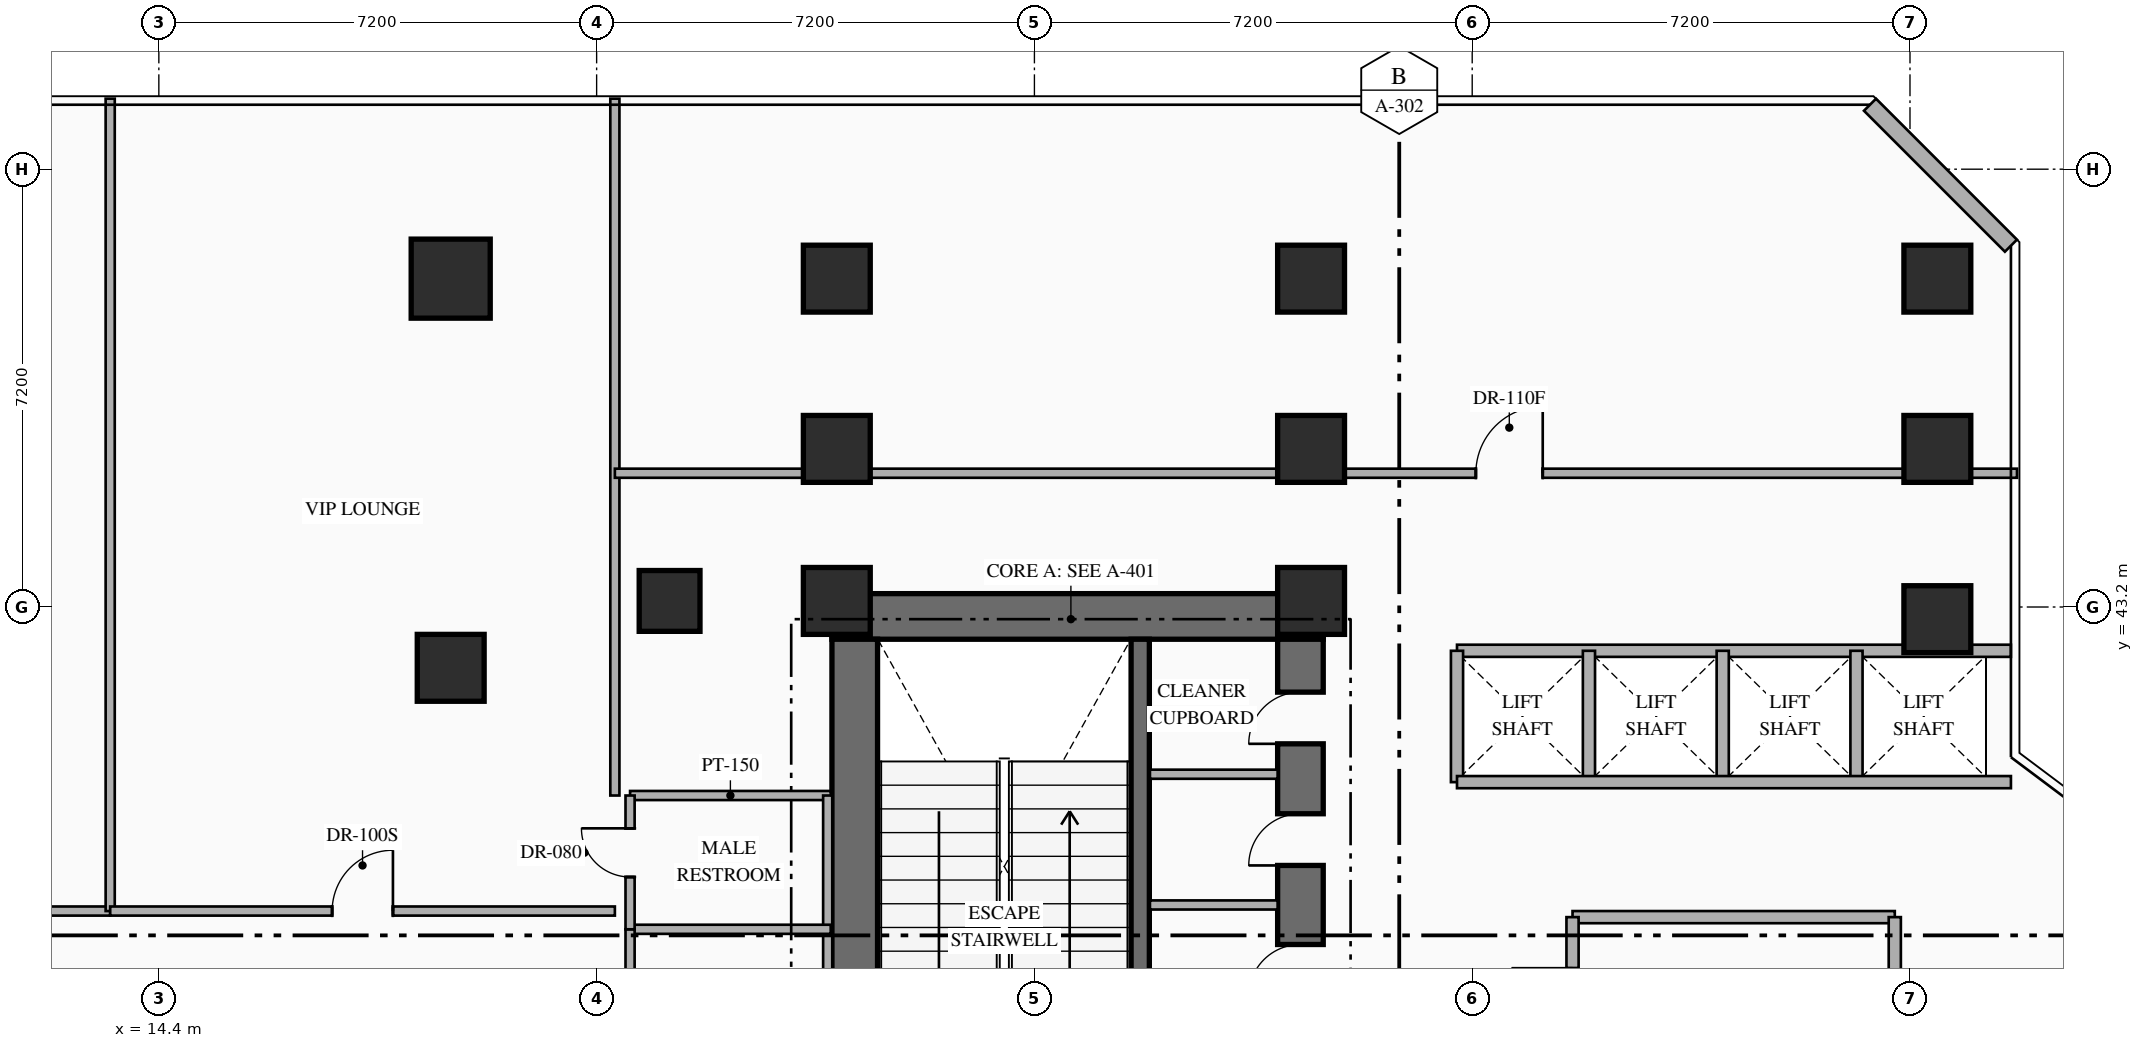
"""IFC4 building model, lengths in metres.
Left out: names, types, materials, properties, quantities, classifications, styles, units other than length and angle.
Written with IfcOpenShell. Run it as: python <this file> out.ifc"""

import sys

from ifc_helpers import new_model, si_unit, direction, frame, frame_2d, origin, origin_2d, place, context, subcontext, project, spatial, rectangle, hollow_rectangle, extrude, element, fill, save


model = new_model("IFC4")
c1 = context("Model", 3, precision=1e-05, world=origin(), true_north=direction((0.0, 1.0)))
c2 = subcontext(c1, "Body", "Model", "MODEL_VIEW")
j1 = project(units=[si_unit("LENGTHUNIT", "METRE"), si_unit("PLANEANGLEUNIT", "RADIAN")], contexts=[c1])
p1 = place(None, origin())
s1 = spatial("IfcSite", under=j1, at=p1, CompositionType="ELEMENT")
p2 = place(p1, origin())
s2 = spatial("IfcBuilding", under=s1, at=p2, CompositionType="ELEMENT")
p3 = place(p2, frame((0.0, 0.0, 10.8)))
s3 = spatial("IfcBuildingStorey", under=s2, at=p3, CompositionType="ELEMENT", Elevation=10.8)
p4 = place(p3, frame((25.47, 43.045, 0.0), z_axis=(0.0, 0.0, 1.0), x_axis=(1.0, 0.0, 0.0)))
e1 = element("IfcWall", 1, at=p4, inside=s3, PredefinedType="SHEAR", context=c2, shape_type="SweptSolid", body=[
    extrude(rectangle(XDim=8.08, YDim=0.75, at=frame_2d((4.04, 0.0))), origin(), (0.0, 0.0, 1.0), 5.4),
])
p5 = place(p3, frame((25.845, 33.19, 0.0), z_axis=(0.0, 0.0, 1.0), x_axis=(0.0, 1.0, 0.0)))
e2 = element("IfcWall", 2, at=p5, inside=s3, PredefinedType="SHEAR", context=c2, shape_type="SweptSolid", body=[
    extrude(rectangle(XDim=9.48, YDim=0.75, at=frame_2d((4.74, 0.0))), origin(), (0.0, 0.0, 1.0), 5.4),
])
p6 = place(p3, frame((33.175, 33.19, 0.0), z_axis=(0.0, 0.0, 1.0), x_axis=(0.0, 1.0, 0.0)))
e3 = element("IfcWall", 3, at=p6, inside=s3, PredefinedType="SHEAR", context=c2, shape_type="SweptSolid", body=[
    extrude(rectangle(XDim=9.48, YDim=0.75, at=frame_2d((4.74, 0.0))), origin(), (0.0, 0.0, 1.0), 5.4),
])
p7 = place(p6, frame((3.61, 0.0, 0.0)))
e4 = element("IfcOpeningElement", 4, at=p7, cuts=e3, PredefinedType="OPENING", context=c2, shape_type="SweptSolid", body=[
    extrude(rectangle(XDim=0.85, YDim=2.08, at=frame_2d((0.425, 1.04))), frame((0.0, 0.385, 0.0), z_axis=(0.0, -1.0, 0.0), x_axis=(1.0, 0.0, 0.0)), (0.0, 0.0, 1.0), 0.77),
])
p8 = place(p6, frame((5.76, 0.0, 0.0)))
e5 = element("IfcOpeningElement", 5, at=p8, cuts=e3, PredefinedType="OPENING", context=c2, shape_type="SweptSolid", body=[
    extrude(rectangle(XDim=0.85, YDim=2.08, at=frame_2d((0.425, 1.04))), frame((0.0, 0.385, 0.0), z_axis=(0.0, -1.0, 0.0), x_axis=(1.0, 0.0, 0.0)), (0.0, 0.0, 1.0), 0.77),
])
p9 = place(p6, frame((7.76, 0.0, 0.0)))
e6 = element("IfcOpeningElement", 6, at=p9, cuts=e3, PredefinedType="OPENING", context=c2, shape_type="SweptSolid", body=[
    extrude(rectangle(XDim=0.85, YDim=2.08, at=frame_2d((0.425, 1.04))), frame((0.0, 0.385, 0.0), z_axis=(0.0, -1.0, 0.0), x_axis=(1.0, 0.0, 0.0)), (0.0, 0.0, 1.0), 0.77),
])
p10 = place(p3, frame((30.54, 33.19, 0.0), z_axis=(0.0, 0.0, 1.0), x_axis=(0.0, 1.0, 0.0)))
e7 = element("IfcWall", 7, at=p10, inside=s3, PredefinedType="SHEAR", context=c2, shape_type="SweptSolid", body=[
    extrude(rectangle(XDim=9.48, YDim=0.3, at=frame_2d((4.74, 0.0))), origin(), (0.0, 0.0, 1.0), 5.4),
])
for number, where, z_axis, x_axis in (
    (8, (25.55, 43.3, 0.0), (0.0, 0.0, 1.0), (1.0, 0.0, 0.0)),
    (9, (33.35, 43.3, 0.0), (0.0, 0.0, 1.0), (1.0, 0.0, 0.0)),
    (10, (43.65, 43.0, 0.0), (0.0, 0.0, 1.0), (1.0, 0.0, 0.0)),
):
    element("IfcColumn", number, at=place(p3, frame(where, z_axis=z_axis, x_axis=x_axis)), inside=s3, PredefinedType="COLUMN", context=c2, shape_type="SweptSolid", body=[
        extrude(rectangle(XDim=1.1, YDim=1.1, at=origin_2d()), origin(), (0.0, 0.0, 1.0), 5.4),
    ])
for number, where, z_axis, x_axis in (
    (11, (25.55, 45.8, 0.0), (0.0, 0.0, 1.0), (1.0, 0.0, 0.0)),
    (12, (33.35, 45.8, 0.0), (0.0, 0.0, 1.0), (1.0, 0.0, 0.0)),
    (13, (43.65, 45.8, 0.0), (0.0, 0.0, 1.0), (1.0, 0.0, 0.0)),
):
    element("IfcColumn", number, at=place(p3, frame(where, z_axis=z_axis, x_axis=x_axis)), inside=s3, PredefinedType="COLUMN", context=c2, shape_type="SweptSolid", body=[
        extrude(hollow_rectangle(XDim=1.1, YDim=1.1, WallThickness=0.04, at=origin_2d()), origin(), (0.0, 0.0, 1.0), 5.4),
    ])
p11 = place(p3, frame((19.2, 48.6, 0.0), z_axis=(0.0, 0.0, 1.0), x_axis=(1.0, 0.0, 0.0)))
e14 = element("IfcColumn", 14, at=p11, inside=s3, PredefinedType="COLUMN", context=c2, shape_type="SweptSolid", body=[
    extrude(rectangle(XDim=1.3, YDim=1.3, at=origin_2d()), origin(), (0.0, 0.0, 1.0), 5.4),
])
for number, where, z_axis, x_axis in (
    (15, (25.55, 48.6, 0.0), (0.0, 0.0, 1.0), (1.0, 0.0, 0.0)),
    (16, (33.35, 48.6, 0.0), (0.0, 0.0, 1.0), (1.0, 0.0, 0.0)),
    (17, (43.65, 48.6, 0.0), (0.0, 0.0, 1.0), (1.0, 0.0, 0.0)),
    (18, (19.2, 42.2, 0.0), (0.0, 0.0, 1.0), (1.0, 0.0, 0.0)),
):
    element("IfcColumn", number, at=place(p3, frame(where, z_axis=z_axis, x_axis=x_axis)), inside=s3, PredefinedType="COLUMN", context=c2, shape_type="SweptSolid", body=[
        extrude(hollow_rectangle(XDim=1.1, YDim=1.1, WallThickness=0.04, at=origin_2d()), origin(), (0.0, 0.0, 1.0), 5.4),
    ])
p12 = place(p3, frame((22.8, 43.3, 0.0), z_axis=(0.0, 0.0, 1.0), x_axis=(1.0, 0.0, 0.0)))
e19 = element("IfcColumn", 19, at=p12, inside=s3, PredefinedType="COLUMN", context=c2, shape_type="SweptSolid", body=[
    extrude(hollow_rectangle(XDim=1.0, YDim=1.0, WallThickness=0.038, at=origin_2d()), origin(), (0.0, 0.0, 1.0), 5.4),
])
p13 = place(p3, frame((42.542, 51.46, 0.0), z_axis=(0.0, 0.0, 1.0), x_axis=(0.707144017911, -0.707069542501, 0.0)))
e20 = element("IfcWall", 20, at=p13, inside=s3, PredefinedType="STANDARD", context=c2, shape_type="SweptSolid", body=[
    extrude(rectangle(XDim=3.278, YDim=0.28, at=frame_2d((1.639, 0.0))), origin(), (0.0, 0.0, 1.0), 5.1),
])
for number, where, z_axis, x_axis in (
    (21, (30.7, 38.3, 0.0), (0.0, 0.0, 1.0), (1.0, 0.0, 0.0)),
    (22, (30.7, 40.45, 0.0), (0.0, 0.0, 1.0), (1.0, 0.0, 0.0)),
):
    element("IfcWall", number, at=place(p3, frame(where, z_axis=z_axis, x_axis=x_axis)), inside=s3, PredefinedType="PARTITIONING", context=c2, shape_type="SweptSolid", body=[
        extrude(rectangle(XDim=2.1, YDim=0.15, at=frame_2d((1.05, 0.0))), origin(), (0.0, 0.0, 1.0), 5.1),
    ])
p14 = place(p3, frame((37.65, 38.1, 0.0), z_axis=(0.0, 0.0, 1.0), x_axis=(1.0, 0.0, 0.0)))
e23 = element("IfcWall", 23, at=p14, inside=s3, PredefinedType="STANDARD", context=c2, shape_type="SweptSolid", body=[
    extrude(rectangle(XDim=5.3, YDim=0.2, at=frame_2d((2.65, 0.0))), origin(), (0.0, 0.0, 1.0), 5.1),
])
p15 = place(p3, frame((42.95, 35.42, 0.0), z_axis=(0.0, 0.0, 1.0), x_axis=(0.0, 1.0, 0.0)))
e24 = element("IfcWall", 24, at=p15, inside=s3, PredefinedType="STANDARD", context=c2, shape_type="SweptSolid", body=[
    extrude(rectangle(XDim=2.68, YDim=0.2, at=frame_2d((1.34, 0.0))), origin(), (0.0, 0.0, 1.0), 5.1),
])
p16 = place(p3, frame((37.65, 35.42, 0.0), z_axis=(0.0, 0.0, 1.0), x_axis=(0.0, 1.0, 0.0)))
e25 = element("IfcWall", 25, at=p16, inside=s3, PredefinedType="STANDARD", context=c2, shape_type="SweptSolid", body=[
    extrude(rectangle(XDim=2.68, YDim=0.2, at=frame_2d((1.34, 0.0))), origin(), (0.0, 0.0, 1.0), 5.1),
])
p17 = place(p16, frame((0.84, 0.0, 0.0)))
e26 = element("IfcOpeningElement", 26, at=p17, cuts=e25, PredefinedType="OPENING", context=c2, shape_type="SweptSolid", body=[
    extrude(rectangle(XDim=1.0, YDim=2.2, at=frame_2d((0.5, 1.1))), frame((0.0, 0.11, 0.0), z_axis=(0.0, -1.0, 0.0), x_axis=(1.0, 0.0, 0.0)), (0.0, 0.0, 1.0), 0.22),
])
p18 = place(p3, frame((35.75, 42.48, 0.0), z_axis=(0.0, 0.0, 1.0), x_axis=(1.0, 0.0, 0.0)))
e27 = element("IfcWall", 27, at=p18, inside=s3, PredefinedType="STANDARD", context=c2, shape_type="SweptSolid", body=[
    extrude(rectangle(XDim=9.11, YDim=0.2, at=frame_2d((4.555, 0.0))), origin(), (0.0, 0.0, 1.0), 5.1),
])
for number, where, z_axis, x_axis in (
    (28, (35.75, 40.32, 0.0), (0.0, 0.0, 1.0), (0.0, 1.0, 0.0)),
    (29, (37.92, 40.32, 0.0), (0.0, 0.0, 1.0), (0.0, 1.0, 0.0)),
    (30, (40.12, 40.32, 0.0), (0.0, 0.0, 1.0), (0.0, 1.0, 0.0)),
    (31, (42.32, 40.32, 0.0), (0.0, 0.0, 1.0), (0.0, 1.0, 0.0)),
):
    element("IfcWall", number, at=place(p3, frame(where, z_axis=z_axis, x_axis=x_axis)), inside=s3, PredefinedType="STANDARD", context=c2, shape_type="SweptSolid", body=[
        extrude(rectangle(XDim=2.16, YDim=0.2, at=frame_2d((1.08, 0.0))), origin(), (0.0, 0.0, 1.0), 5.1),
    ])
p19 = place(p3, frame((35.75, 40.32, 0.0), z_axis=(0.0, 0.0, 1.0), x_axis=(1.0, 0.0, 0.0)))
e32 = element("IfcWall", 32, at=p19, inside=s3, PredefinedType="STANDARD", context=c2, shape_type="SweptSolid", body=[
    extrude(rectangle(XDim=9.11, YDim=0.2, at=frame_2d((4.555, 0.0))), origin(), (0.0, 0.0, 1.0), 5.1),
])
p20 = place(p3, frame((22.15, 40.1, 0.0), z_axis=(0.0, 0.0, 1.0), x_axis=(1.0, 0.0, 0.0)))
e33 = element("IfcWall", 33, at=p20, inside=s3, PredefinedType="PARTITIONING", context=c2, shape_type="SweptSolid", body=[
    extrude(rectangle(XDim=3.3, YDim=0.15, at=frame_2d((1.65, 0.0))), origin(), (0.0, 0.0, 1.0), 5.1),
])
p21 = place(p3, frame((25.4, 33.5, 0.0), z_axis=(0.0, 0.0, 1.0), x_axis=(0.0, 1.0, 0.0)))
e34 = element("IfcWall", 34, at=p21, inside=s3, PredefinedType="PARTITIONING", context=c2, shape_type="SweptSolid", body=[
    extrude(rectangle(XDim=6.6, YDim=0.15, at=frame_2d((3.3, 0.0))), origin(), (0.0, 0.0, 1.0), 5.1),
])
p22 = place(p3, frame((22.15, 37.9, 0.0), z_axis=(0.0, 0.0, 1.0), x_axis=(1.0, 0.0, 0.0)))
e35 = element("IfcWall", 35, at=p22, inside=s3, PredefinedType="PARTITIONING", context=c2, shape_type="SweptSolid", body=[
    extrude(rectangle(XDim=3.3, YDim=0.15, at=frame_2d((1.65, 0.0))), origin(), (0.0, 0.0, 1.0), 5.1),
])
p23 = place(p3, frame((22.15, 35.7, 0.0), z_axis=(0.0, 0.0, 1.0), x_axis=(0.0, 1.0, 0.0)))
e36 = element("IfcWall", 36, at=p23, inside=s3, PredefinedType="PARTITIONING", context=c2, shape_type="SweptSolid", body=[
    extrude(rectangle(XDim=2.2, YDim=0.15, at=frame_2d((1.1, 0.0))), origin(), (0.0, 0.0, 1.0), 5.1),
])
p24 = place(p23, frame((0.7, 0.0, 0.0)))
e37 = element("IfcOpeningElement", 37, at=p24, cuts=e36, PredefinedType="OPENING", context=c2, shape_type="SweptSolid", body=[
    extrude(rectangle(XDim=0.8, YDim=2.06, at=frame_2d((0.4, 1.03))), frame((0.0, 0.085, 0.0), z_axis=(0.0, -1.0, 0.0), x_axis=(1.0, 0.0, 0.0)), (0.0, 0.0, 1.0), 0.17),
])
p25 = place(p3, frame((22.15, 37.9, 0.0), z_axis=(0.0, 0.0, 1.0), x_axis=(0.0, 1.0, 0.0)))
e38 = element("IfcWall", 38, at=p25, inside=s3, PredefinedType="PARTITIONING", context=c2, shape_type="SweptSolid", body=[
    extrude(rectangle(XDim=2.2, YDim=0.15, at=frame_2d((1.1, 0.0))), origin(), (0.0, 0.0, 1.0), 5.1),
])
p26 = place(p25, frame((0.86, 0.0, 0.0)))
e39 = element("IfcOpeningElement", 39, at=p26, cuts=e38, PredefinedType="OPENING", context=c2, shape_type="SweptSolid", body=[
    extrude(rectangle(XDim=0.8, YDim=2.06, at=frame_2d((0.4, 1.03))), frame((0.0, 0.085, 0.0), z_axis=(0.0, -1.0, 0.0), x_axis=(1.0, 0.0, 0.0)), (0.0, 0.0, 1.0), 0.17),
])
p27 = place(p3, frame((6.2, 38.2, 0.0), z_axis=(0.0, 0.0, 1.0), x_axis=(1.0, 0.0, 0.0)))
e40 = element("IfcWall", 40, at=p27, inside=s3, PredefinedType="PARTITIONING", context=c2, shape_type="SweptSolid", body=[
    extrude(rectangle(XDim=7.4, YDim=0.15, at=frame_2d((3.7, 0.0))), origin(), (0.0, 0.0, 1.0), 5.1),
])
p28 = place(p27, frame((3.2, 0.0, 0.0)))
e41 = element("IfcOpeningElement", 41, at=p28, cuts=e40, PredefinedType="OPENING", context=c2, shape_type="SweptSolid", body=[
    extrude(rectangle(XDim=1.0, YDim=2.15, at=frame_2d((0.5, 1.075))), frame((0.0, 0.085, 0.0), z_axis=(0.0, -1.0, 0.0), x_axis=(1.0, 0.0, 0.0)), (0.0, 0.0, 1.0), 0.17),
])
p29 = place(p3, frame((13.6, 38.2, 0.0), z_axis=(0.0, 0.0, 1.0), x_axis=(0.0, 1.0, 0.0)))
e42 = element("IfcWall", 42, at=p29, inside=s3, PredefinedType="PARTITIONING", context=c2, shape_type="SweptSolid", body=[
    extrude(rectangle(XDim=13.36, YDim=0.15, at=frame_2d((6.68, 0.0))), origin(), (0.0, 0.0, 1.0), 5.1),
])
p30 = place(p3, frame((13.6, 38.2, 0.0), z_axis=(0.0, 0.0, 1.0), x_axis=(1.0, 0.0, 0.0)))
e43 = element("IfcWall", 43, at=p30, inside=s3, PredefinedType="PARTITIONING", context=c2, shape_type="SweptSolid", body=[
    extrude(rectangle(XDim=8.3, YDim=0.15, at=frame_2d((4.15, 0.0))), origin(), (0.0, 0.0, 1.0), 5.1),
])
p31 = place(p30, frame((3.65, 0.0, 0.0)))
e44 = element("IfcOpeningElement", 44, at=p31, cuts=e43, PredefinedType="OPENING", context=c2, shape_type="SweptSolid", body=[
    extrude(rectangle(XDim=1.0, YDim=2.15, at=frame_2d((0.5, 1.075))), frame((0.0, 0.085, 0.0), z_axis=(0.0, -1.0, 0.0), x_axis=(1.0, 0.0, 0.0)), (0.0, 0.0, 1.0), 0.17),
])
p32 = place(p3, frame((21.9, 40.1, 0.0), z_axis=(0.0, 0.0, 1.0), x_axis=(0.0, 1.0, 0.0)))
e45 = element("IfcWall", 45, at=p32, inside=s3, PredefinedType="PARTITIONING", context=c2, shape_type="SweptSolid", body=[
    extrude(rectangle(XDim=11.46, YDim=0.15, at=frame_2d((5.73, 0.0))), origin(), (0.0, 0.0, 1.0), 5.1),
])
p33 = place(p3, frame((21.9, 45.4, 0.0), z_axis=(0.0, 0.0, 1.0), x_axis=(1.0, 0.0, 0.0)))
e46 = element("IfcWall", 46, at=p33, inside=s3, PredefinedType="PARTITIONING", context=c2, shape_type="SweptSolid", body=[
    extrude(rectangle(XDim=23.06, YDim=0.15, at=frame_2d((11.53, 0.0))), origin(), (0.0, 0.0, 1.0), 5.1),
])
p34 = place(p33, frame((14.16, 0.0, 0.0)))
e47 = element("IfcOpeningElement", 47, at=p34, cuts=e46, PredefinedType="OPENING", context=c2, shape_type="SweptSolid", body=[
    extrude(rectangle(XDim=1.1, YDim=2.24, at=frame_2d((0.55, 1.12))), frame((0.0, 0.085, 0.0), z_axis=(0.0, -1.0, 0.0), x_axis=(1.0, 0.0, 0.0)), (0.0, 0.0, 1.0), 0.17),
])
p35 = place(p7, origin())
e48 = element("IfcDoor", 48, at=p35, inside=s3, OperationType="SINGLE_SWING_LEFT", PredefinedType="DOOR", context=c2, shape_type="SweptSolid", body=[
    extrude(rectangle(XDim=0.85, YDim=2.08, at=frame_2d((0.425, 1.04))), frame((0.0, 0.025, 0.0), z_axis=(0.0, -1.0, 0.0), x_axis=(1.0, 0.0, 0.0)), (0.0, 0.0, 1.0), 0.05),
])
fill(e4, e48)
p36 = place(p8, origin())
e49 = element("IfcDoor", 49, at=p36, inside=s3, OperationType="SINGLE_SWING_LEFT", PredefinedType="DOOR", context=c2, shape_type="SweptSolid", body=[
    extrude(rectangle(XDim=0.85, YDim=2.08, at=frame_2d((0.425, 1.04))), frame((0.0, 0.025, 0.0), z_axis=(0.0, -1.0, 0.0), x_axis=(1.0, 0.0, 0.0)), (0.0, 0.0, 1.0), 0.05),
])
fill(e5, e49)
p37 = place(p9, origin())
e50 = element("IfcDoor", 50, at=p37, inside=s3, OperationType="SINGLE_SWING_LEFT", PredefinedType="DOOR", context=c2, shape_type="SweptSolid", body=[
    extrude(rectangle(XDim=0.85, YDim=2.08, at=frame_2d((0.425, 1.04))), frame((0.0, 0.025, 0.0), z_axis=(0.0, -1.0, 0.0), x_axis=(1.0, 0.0, 0.0)), (0.0, 0.0, 1.0), 0.05),
])
fill(e6, e50)
p38 = place(p17, origin())
e51 = element("IfcDoor", 51, at=p38, inside=s3, OperationType="SINGLE_SWING_RIGHT", PredefinedType="DOOR", context=c2, shape_type="SweptSolid", body=[
    extrude(rectangle(XDim=1.0, YDim=2.2, at=frame_2d((0.5, 1.1))), frame((0.0, 0.025, 0.0), z_axis=(0.0, -1.0, 0.0), x_axis=(1.0, 0.0, 0.0)), (0.0, 0.0, 1.0), 0.05),
])
fill(e26, e51)
p39 = place(p26, origin())
e52 = element("IfcDoor", 52, at=p39, inside=s3, OperationType="SINGLE_SWING_RIGHT", PredefinedType="DOOR", context=c2, shape_type="SweptSolid", body=[
    extrude(rectangle(XDim=0.8, YDim=2.06, at=frame_2d((0.4, 1.03))), frame((0.0, 0.025, 0.0), z_axis=(0.0, -1.0, 0.0), x_axis=(1.0, 0.0, 0.0)), (0.0, 0.0, 1.0), 0.05),
])
fill(e39, e52)
p40 = place(p31, origin())
e53 = element("IfcDoor", 53, at=p40, inside=s3, OperationType="SINGLE_SWING_RIGHT", PredefinedType="DOOR", context=c2, shape_type="SweptSolid", body=[
    extrude(rectangle(XDim=1.0, YDim=2.15, at=frame_2d((0.5, 1.075))), frame((0.0, 0.025, 0.0), z_axis=(0.0, -1.0, 0.0), x_axis=(1.0, 0.0, 0.0)), (0.0, 0.0, 1.0), 0.05),
])
fill(e44, e53)
p41 = place(p34, origin())
e54 = element("IfcDoor", 54, at=p41, inside=s3, OperationType="SINGLE_SWING_RIGHT", PredefinedType="DOOR", context=c2, shape_type="SweptSolid", body=[
    extrude(rectangle(XDim=1.1, YDim=2.24, at=frame_2d((0.55, 1.12))), frame((0.0, 0.025, 0.0), z_axis=(0.0, -1.0, 0.0), x_axis=(1.0, 0.0, 0.0)), (0.0, 0.0, 1.0), 0.05),
])
fill(e47, e54)
save(model, sys.argv[1])
